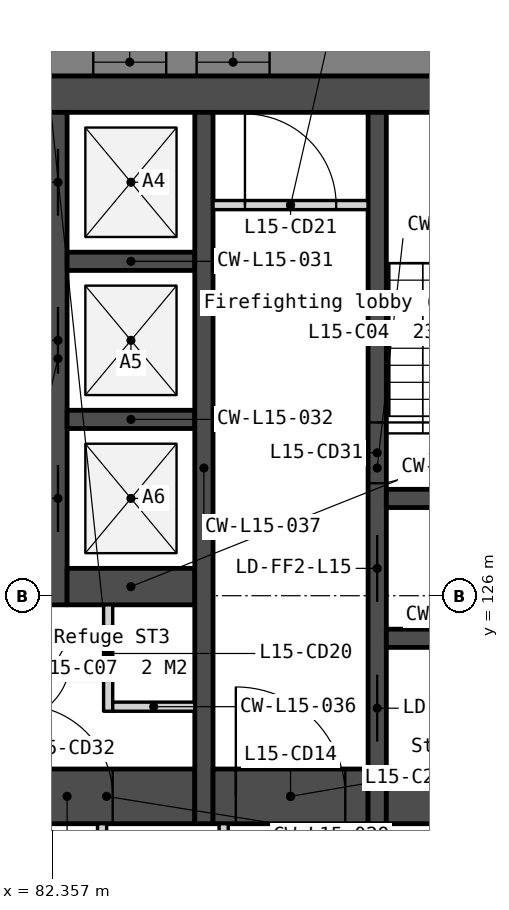
"""IFC4 building model, lengths in metres.
Left out: names, types, materials, properties, quantities, classifications, styles, units other than length and angle.
Written with IfcOpenShell. Run it as: python <this file> out.ifc"""

import sys

from ifc_helpers import new_model, si_unit, direction, frame, frame_2d, origin, place, context, subcontext, project, spatial, polyline, rectangle, outline, extrude, element, fill, save


model = new_model("IFC4")
c1 = context("Model", 3, precision=1e-05, world=origin(), true_north=direction((0.0, 1.0)))
c2 = subcontext(c1, "Body", "Model", "MODEL_VIEW")
j1 = project(units=[si_unit("LENGTHUNIT", "METRE"), si_unit("PLANEANGLEUNIT", "RADIAN")], contexts=[c1])
p1 = place(None, origin())
s1 = spatial("IfcSite", under=j1, at=p1, CompositionType="ELEMENT")
p2 = place(p1, origin())
s2 = spatial("IfcBuilding", under=s1, at=p2, CompositionType="ELEMENT")
p3 = place(p2, frame((0.0, 0.0, 66.5)))
s3 = spatial("IfcBuildingStorey", under=s2, at=p3, CompositionType="ELEMENT", Elevation=66.5)
p4 = place(p3, frame((66.0, 134.25, 0.0), z_axis=(0.0, 0.0, 1.0), x_axis=(1.0, 0.0, 0.0)))
e1 = element("IfcWall", 1, at=p4, inside=s3, PredefinedType="SOLIDWALL", context=c2, shape_type="SweptSolid", body=[
    extrude(rectangle(XDim=28.0, YDim=0.6, at=frame_2d((14.0, 0.0))), origin(), (0.0, 0.0, 1.0), 3.35),
])
p5 = place(p3, frame((81.8, 122.7, 0.0), z_axis=(0.0, 0.0, 1.0), x_axis=(1.0, 0.0, 0.0)))
e2 = element("IfcWall", 2, at=p5, inside=s3, PredefinedType="SOLIDWALL", context=c2, shape_type="SweptSolid", body=[
    extrude(rectangle(XDim=2.9, YDim=0.9, at=frame_2d((1.45, 0.0))), origin(), (0.0, 0.0, 1.0), 3.35),
])
p6 = place(p5, frame((0.05, 0.0, 0.0)))
e3 = element("IfcOpeningElement", 3, at=p6, cuts=e2, PredefinedType="OPENING", context=c2, shape_type="SweptSolid", body=[
    extrude(rectangle(XDim=1.5, YDim=2.1, at=frame_2d((0.75, 1.05))), frame((0.0, 0.46, 0.0), z_axis=(0.0, -1.0, 0.0), x_axis=(1.0, 0.0, 0.0)), (0.0, 0.0, 1.0), 0.92),
])
p7 = place(p3, frame((82.45, 133.95, 0.0), z_axis=(0.0, 0.0, 1.0), x_axis=(0.0, -1.0, 0.0)))
e4 = element("IfcWall", 4, at=p7, inside=s3, PredefinedType="SOLIDWALL", context=c2, shape_type="SweptSolid", body=[
    extrude(rectangle(XDim=8.1, YDim=0.3, at=frame_2d((4.05, 0.0))), origin(), (0.0, 0.0, 1.0), 3.35),
])
p8 = place(p7, frame((0.6, 0.0, 0.0)))
e5 = element("IfcOpeningElement", 5, at=p8, cuts=e4, PredefinedType="OPENING", context=c2, shape_type="SweptSolid", body=[
    extrude(rectangle(XDim=1.1, YDim=2.1, at=frame_2d((0.55, 1.05))), frame((0.0, 0.16, 0.0), z_axis=(0.0, -1.0, 0.0), x_axis=(1.0, 0.0, 0.0)), (0.0, 0.0, 1.0), 0.32),
])
p9 = place(p7, frame((3.2, 0.0, 0.0)))
e6 = element("IfcOpeningElement", 6, at=p9, cuts=e4, PredefinedType="OPENING", context=c2, shape_type="SweptSolid", body=[
    extrude(rectangle(XDim=1.1, YDim=2.1, at=frame_2d((0.55, 1.05))), frame((0.0, 0.16, 0.0), z_axis=(0.0, -1.0, 0.0), x_axis=(1.0, 0.0, 0.0)), (0.0, 0.0, 1.0), 0.32),
])
p10 = place(p7, frame((5.8, 0.0, 0.0)))
e7 = element("IfcOpeningElement", 7, at=p10, cuts=e4, PredefinedType="OPENING", context=c2, shape_type="SweptSolid", body=[
    extrude(rectangle(XDim=1.1, YDim=2.1, at=frame_2d((0.55, 1.05))), frame((0.0, 0.16, 0.0), z_axis=(0.0, -1.0, 0.0), x_axis=(1.0, 0.0, 0.0)), (0.0, 0.0, 1.0), 0.32),
])
for number, where, z_axis, x_axis in (
    (8, (82.6, 131.5, 0.0), (0.0, 0.0, 1.0), (1.0, 0.0, 0.0)),
    (9, (82.6, 128.9, 0.0), (0.0, 0.0, 1.0), (1.0, 0.0, 0.0)),
):
    element("IfcWall", number, at=place(p3, frame(where, z_axis=z_axis, x_axis=x_axis)), inside=s3, PredefinedType="SOLIDWALL", context=c2, shape_type="SweptSolid", body=[
        extrude(rectangle(XDim=2.1, YDim=0.3, at=frame_2d((1.05, 0.0))), origin(), (0.0, 0.0, 1.0), 3.35),
    ])
p11 = place(p3, frame((82.6, 126.15, 0.0), z_axis=(0.0, 0.0, 1.0), x_axis=(1.0, 0.0, 0.0)))
e10 = element("IfcWall", 10, at=p11, inside=s3, PredefinedType="SOLIDWALL", context=c2, shape_type="SweptSolid", body=[
    extrude(rectangle(XDim=2.1, YDim=0.6, at=frame_2d((1.05, 0.0))), origin(), (0.0, 0.0, 1.0), 3.35),
])
p12 = place(p3, frame((83.175, 122.25, 0.0), z_axis=(0.0, 0.0, 1.0), x_axis=(0.0, -1.0, 0.0)))
e11 = element("IfcWall", 11, at=p12, inside=s3, PredefinedType="PARTITIONING", context=c2, shape_type="SweptSolid", body=[
    extrude(rectangle(XDim=2.1, YDim=0.15, at=frame_2d((1.05, 0.0))), origin(), (0.0, 0.0, 1.0), 3.35),
])
p13 = place(p3, frame((83.275, 125.85, 0.0), z_axis=(0.0, 0.0, 1.0), x_axis=(0.0, -1.0, 0.0)))
e12 = element("IfcWall", 12, at=p13, inside=s3, PredefinedType="PARTITIONING", context=c2, shape_type="SweptSolid", body=[
    extrude(rectangle(XDim=1.75, YDim=0.15, at=frame_2d((0.875, 0.0))), origin(), (0.0, 0.0, 1.0), 3.35),
])
p14 = place(p13, frame((0.35, 0.0, 0.0)))
e13 = element("IfcOpeningElement", 13, at=p14, cuts=e12, PredefinedType="OPENING", context=c2, shape_type="SweptSolid", body=[
    extrude(rectangle(XDim=0.9, YDim=2.1, at=frame_2d((0.45, 1.05))), frame((0.0, 0.085, 0.0), z_axis=(0.0, -1.0, 0.0), x_axis=(1.0, 0.0, 0.0)), (0.0, 0.0, 1.0), 0.17),
])
p15 = place(p3, frame((83.35, 124.175, 0.0), z_axis=(0.0, 0.0, 1.0), x_axis=(1.0, 0.0, 0.0)))
e14 = element("IfcWall", 14, at=p15, inside=s3, PredefinedType="PARTITIONING", context=c2, shape_type="SweptSolid", body=[
    extrude(rectangle(XDim=1.35, YDim=0.15, at=frame_2d((0.675, 0.0))), origin(), (0.0, 0.0, 1.0), 3.35),
])
p16 = place(p3, frame((84.85, 133.95, 0.0), z_axis=(0.0, 0.0, 1.0), x_axis=(0.0, -1.0, 0.0)))
e15 = element("IfcWall", 15, at=p16, inside=s3, PredefinedType="SOLIDWALL", context=c2, shape_type="SweptSolid", body=[
    extrude(rectangle(XDim=11.7, YDim=0.3, at=frame_2d((5.85, 0.0))), origin(), (0.0, 0.0, 1.0), 3.35),
])
p17 = place(p3, frame((85.0, 132.425, 0.0), z_axis=(0.0, 0.0, 1.0), x_axis=(1.0, 0.0, 0.0)))
e16 = element("IfcWall", 16, at=p17, inside=s3, PredefinedType="PARTITIONING", context=c2, shape_type="SweptSolid", body=[
    extrude(rectangle(XDim=2.55, YDim=0.15, at=frame_2d((1.275, 0.0))), origin(), (0.0, 0.0, 1.0), 3.35),
])
p18 = place(p17, frame((0.525, 0.0, 0.0)))
e17 = element("IfcOpeningElement", 17, at=p18, cuts=e16, PredefinedType="OPENING", context=c2, shape_type="SweptSolid", body=[
    extrude(rectangle(XDim=1.5, YDim=2.1, at=frame_2d((0.75, 1.05))), frame((0.0, 0.085, 0.0), z_axis=(0.0, -1.0, 0.0), x_axis=(1.0, 0.0, 0.0)), (0.0, 0.0, 1.0), 0.17),
])
p19 = place(p3, frame((85.0, 122.7, 0.0), z_axis=(0.0, 0.0, 1.0), x_axis=(1.0, 0.0, 0.0)))
e18 = element("IfcWall", 18, at=p19, inside=s3, PredefinedType="SOLIDWALL", context=c2, shape_type="SweptSolid", body=[
    extrude(rectangle(XDim=2.55, YDim=0.9, at=frame_2d((1.275, 0.0))), origin(), (0.0, 0.0, 1.0), 3.35),
])
p20 = place(p19, frame((0.375, 0.0, 0.0)))
e19 = element("IfcOpeningElement", 19, at=p20, cuts=e18, PredefinedType="OPENING", context=c2, shape_type="SweptSolid", body=[
    extrude(rectangle(XDim=1.8, YDim=2.1, at=frame_2d((0.9, 1.05))), frame((0.0, 0.46, 0.0), z_axis=(0.0, -1.0, 0.0), x_axis=(1.0, 0.0, 0.0)), (0.0, 0.0, 1.0), 0.92),
])
p21 = place(p3, frame((85.175, 122.25, 0.0), z_axis=(0.0, 0.0, 1.0), x_axis=(0.0, -1.0, 0.0)))
e20 = element("IfcWall", 20, at=p21, inside=s3, PredefinedType="PARTITIONING", context=c2, shape_type="SweptSolid", body=[
    extrude(rectangle(XDim=2.1, YDim=0.15, at=frame_2d((1.05, 0.0))), origin(), (0.0, 0.0, 1.0), 3.35),
])
p22 = place(p21, frame((0.55, 0.0, 0.0)))
e21 = element("IfcOpeningElement", 21, at=p22, cuts=e20, PredefinedType="OPENING", context=c2, shape_type="SweptSolid", body=[
    extrude(rectangle(XDim=1.0, YDim=2.1, at=frame_2d((0.5, 1.05))), frame((0.0, 0.085, 0.0), z_axis=(0.0, -1.0, 0.0), x_axis=(1.0, 0.0, 0.0)), (0.0, 0.0, 1.0), 0.17),
])
p23 = place(p3, frame((87.375, 122.25, 0.0), z_axis=(0.0, 0.0, 1.0), x_axis=(0.0, -1.0, 0.0)))
e22 = element("IfcWall", 22, at=p23, inside=s3, PredefinedType="PARTITIONING", context=c2, shape_type="SweptSolid", body=[
    extrude(rectangle(XDim=2.1, YDim=0.15, at=frame_2d((1.05, 0.0))), origin(), (0.0, 0.0, 1.0), 3.35),
])
p24 = place(p3, frame((87.7, 133.95, 0.0), z_axis=(0.0, 0.0, 1.0), x_axis=(0.0, -1.0, 0.0)))
e23 = element("IfcWall", 23, at=p24, inside=s3, PredefinedType="SOLIDWALL", context=c2, shape_type="SweptSolid", body=[
    extrude(rectangle(XDim=11.7, YDim=0.3, at=frame_2d((5.85, 0.0))), origin(), (0.0, 0.0, 1.0), 3.35),
])
p25 = place(p24, frame((6.95, 0.0, 0.0)))
e24 = element("IfcOpeningElement", 24, at=p25, cuts=e23, PredefinedType="OPENING", context=c2, shape_type="SweptSolid", body=[
    extrude(rectangle(XDim=1.1, YDim=2.1, at=frame_2d((0.55, 1.05))), frame((0.0, 0.16, 0.0), z_axis=(0.0, -1.0, 0.0), x_axis=(1.0, 0.0, 0.0)), (0.0, 0.0, 1.0), 0.32),
])
p26 = place(p24, frame((5.1, 0.0, 0.0)))
e25 = element("IfcOpeningElement", 25, at=p26, cuts=e23, PredefinedType="OPENING", context=c2, shape_type="SweptSolid", body=[
    extrude(rectangle(XDim=1.0, YDim=2.1, at=frame_2d((0.5, 1.05))), frame((0.0, 0.16, 0.0), z_axis=(0.0, -1.0, 0.0), x_axis=(1.0, 0.0, 0.0)), (0.0, 0.0, 1.0), 0.32),
])
p27 = place(p24, frame((9.25, 0.0, 0.0)))
e26 = element("IfcOpeningElement", 26, at=p27, cuts=e23, PredefinedType="OPENING", context=c2, shape_type="SweptSolid", body=[
    extrude(rectangle(XDim=1.1, YDim=2.1, at=frame_2d((0.55, 1.05))), frame((0.0, 0.16, 0.0), z_axis=(0.0, -1.0, 0.0), x_axis=(1.0, 0.0, 0.0)), (0.0, 0.0, 1.0), 0.32),
])
for number, where, z_axis, x_axis in (
    (27, (87.85, 127.6, 0.0), (0.0, 0.0, 1.0), (1.0, 0.0, 0.0)),
    (28, (87.85, 125.3, 0.0), (0.0, 0.0, 1.0), (1.0, 0.0, 0.0)),
):
    element("IfcWall", number, at=place(p3, frame(where, z_axis=z_axis, x_axis=x_axis)), inside=s3, PredefinedType="SOLIDWALL", context=c2, shape_type="SweptSolid", body=[
        extrude(rectangle(XDim=2.55, YDim=0.3, at=frame_2d((1.275, 0.0))), origin(), (0.0, 0.0, 1.0), 3.35),
    ])
p28 = place(p3, frame((87.85, 122.7, 0.0), z_axis=(0.0, 0.0, 1.0), x_axis=(1.0, 0.0, 0.0)))
e29 = element("IfcWall", 29, at=p28, inside=s3, PredefinedType="SOLIDWALL", context=c2, shape_type="SweptSolid", body=[
    extrude(rectangle(XDim=2.55, YDim=0.9, at=frame_2d((1.275, 0.0))), origin(), (0.0, 0.0, 1.0), 3.35),
])
p29 = place(p3, frame((102.4, 134.775, -0.15), z_axis=(0.0, 0.0, 1.0), x_axis=(-1.0, 0.0, 0.0)))
e30 = element("IfcWall", 30, at=p29, inside=s3, PredefinedType="SOLIDWALL", context=c2, shape_type="SweptSolid", body=[
    extrude(outline(polyline([(44.8, 0.0), (44.8, 3.5), (0.0, 3.5), (0.0, 0.0), (44.8, 0.0)])), frame((0.0, 0.225, 0.0), z_axis=(0.0, -1.0, 0.0), x_axis=(1.0, 0.0, 0.0)), (0.0, 0.0, 1.0), 0.45),
])
p30 = place(p29, frame((0.722, 0.0, 1.05)))
e31 = element("IfcOpeningElement", 31, at=p30, cuts=e30, PredefinedType="OPENING", context=c2, shape_type="SweptSolid", body=[
    extrude(rectangle(XDim=1.2, YDim=1.5, at=frame_2d((0.6, 0.75))), frame((0.0, 0.235, 0.0), z_axis=(0.0, -1.0, 0.0), x_axis=(1.0, 0.0, 0.0)), (0.0, 0.0, 1.0), 0.47),
])
p31 = place(p29, frame((7.51, 0.0, 1.05)))
e32 = element("IfcOpeningElement", 32, at=p31, cuts=e30, PredefinedType="OPENING", context=c2, shape_type="SweptSolid", body=[
    extrude(rectangle(XDim=1.2, YDim=1.5, at=frame_2d((0.6, 0.75))), frame((0.0, 0.235, 0.0), z_axis=(0.0, -1.0, 0.0), x_axis=(1.0, 0.0, 0.0)), (0.0, 0.0, 1.0), 0.47),
])
p32 = place(p29, frame((9.21, 0.0, 1.05)))
e33 = element("IfcOpeningElement", 33, at=p32, cuts=e30, PredefinedType="OPENING", context=c2, shape_type="SweptSolid", body=[
    extrude(rectangle(XDim=1.2, YDim=1.5, at=frame_2d((0.6, 0.75))), frame((0.0, 0.235, 0.0), z_axis=(0.0, -1.0, 0.0), x_axis=(1.0, 0.0, 0.0)), (0.0, 0.0, 1.0), 0.47),
])
p33 = place(p29, frame((16.47, 0.0, 1.05)))
e34 = element("IfcOpeningElement", 34, at=p33, cuts=e30, PredefinedType="OPENING", context=c2, shape_type="SweptSolid", body=[
    extrude(rectangle(XDim=1.2, YDim=1.5, at=frame_2d((0.6, 0.75))), frame((0.0, 0.235, 0.0), z_axis=(0.0, -1.0, 0.0), x_axis=(1.0, 0.0, 0.0)), (0.0, 0.0, 1.0), 0.47),
])
p34 = place(p29, frame((18.17, 0.0, 1.05)))
e35 = element("IfcOpeningElement", 35, at=p34, cuts=e30, PredefinedType="OPENING", context=c2, shape_type="SweptSolid", body=[
    extrude(rectangle(XDim=1.2, YDim=1.5, at=frame_2d((0.6, 0.75))), frame((0.0, 0.235, 0.0), z_axis=(0.0, -1.0, 0.0), x_axis=(1.0, 0.0, 0.0)), (0.0, 0.0, 1.0), 0.47),
])
p35 = place(p29, frame((25.43, 0.0, 1.05)))
e36 = element("IfcOpeningElement", 36, at=p35, cuts=e30, PredefinedType="OPENING", context=c2, shape_type="SweptSolid", body=[
    extrude(rectangle(XDim=1.2, YDim=1.5, at=frame_2d((0.6, 0.75))), frame((0.0, 0.235, 0.0), z_axis=(0.0, -1.0, 0.0), x_axis=(1.0, 0.0, 0.0)), (0.0, 0.0, 1.0), 0.47),
])
p36 = place(p29, frame((27.13, 0.0, 1.05)))
e37 = element("IfcOpeningElement", 37, at=p36, cuts=e30, PredefinedType="OPENING", context=c2, shape_type="SweptSolid", body=[
    extrude(rectangle(XDim=1.2, YDim=1.5, at=frame_2d((0.6, 0.75))), frame((0.0, 0.235, 0.0), z_axis=(0.0, -1.0, 0.0), x_axis=(1.0, 0.0, 0.0)), (0.0, 0.0, 1.0), 0.47),
])
p37 = place(p29, frame((34.39, 0.0, 1.05)))
e38 = element("IfcOpeningElement", 38, at=p37, cuts=e30, PredefinedType="OPENING", context=c2, shape_type="SweptSolid", body=[
    extrude(rectangle(XDim=1.2, YDim=1.5, at=frame_2d((0.6, 0.75))), frame((0.0, 0.235, 0.0), z_axis=(0.0, -1.0, 0.0), x_axis=(1.0, 0.0, 0.0)), (0.0, 0.0, 1.0), 0.47),
])
p38 = place(p29, frame((36.09, 0.0, 1.05)))
e39 = element("IfcOpeningElement", 39, at=p38, cuts=e30, PredefinedType="OPENING", context=c2, shape_type="SweptSolid", body=[
    extrude(rectangle(XDim=1.2, YDim=1.5, at=frame_2d((0.6, 0.75))), frame((0.0, 0.235, 0.0), z_axis=(0.0, -1.0, 0.0), x_axis=(1.0, 0.0, 0.0)), (0.0, 0.0, 1.0), 0.47),
])
p39 = place(p29, frame((42.878, 0.0, 1.05)))
e40 = element("IfcOpeningElement", 40, at=p39, cuts=e30, PredefinedType="OPENING", context=c2, shape_type="SweptSolid", body=[
    extrude(rectangle(XDim=1.2, YDim=1.5, at=frame_2d((0.6, 0.75))), frame((0.0, 0.235, 0.0), z_axis=(0.0, -1.0, 0.0), x_axis=(1.0, 0.0, 0.0)), (0.0, 0.0, 1.0), 0.47),
])
p40 = place(p3, frame((88.435, 99.831, -0.15), z_axis=(0.0, 0.0, 1.0), x_axis=(0.500000806382, 0.866024938219, 0.0)))
e41 = element("IfcWall", 41, at=p40, inside=s3, PredefinedType="SOLIDWALL", context=c2, shape_type="SweptSolid", body=[
    extrude(outline(polyline([(34.14, 3.5), (34.14, 0.0), (0.0, 0.0), (0.0, 3.5), (34.14, 3.5)])), frame((0.0, 0.225, 0.0), z_axis=(0.0, -1.0, 0.0), x_axis=(1.0, 0.0, 0.0)), (0.0, 0.0, 1.0), 0.45),
])
p41 = place(p40, frame((5.81, 0.0, 1.05)))
e42 = element("IfcOpeningElement", 42, at=p41, cuts=e41, PredefinedType="OPENING", context=c2, shape_type="SweptSolid", body=[
    extrude(rectangle(XDim=1.2, YDim=1.5, at=frame_2d((0.6, 0.75))), frame((0.0, 0.235, 0.0), z_axis=(0.0, -1.0, 0.0), x_axis=(1.0, 0.0, 0.0)), (0.0, 0.0, 1.0), 0.47),
])
p42 = place(p40, frame((7.51, 0.0, 1.05)))
e43 = element("IfcOpeningElement", 43, at=p42, cuts=e41, PredefinedType="OPENING", context=c2, shape_type="SweptSolid", body=[
    extrude(rectangle(XDim=1.2, YDim=1.5, at=frame_2d((0.6, 0.75))), frame((0.0, 0.235, 0.0), z_axis=(0.0, -1.0, 0.0), x_axis=(1.0, 0.0, 0.0)), (0.0, 0.0, 1.0), 0.47),
])
p43 = place(p40, frame((14.77, 0.0, 1.05)))
e44 = element("IfcOpeningElement", 44, at=p43, cuts=e41, PredefinedType="OPENING", context=c2, shape_type="SweptSolid", body=[
    extrude(rectangle(XDim=1.2, YDim=1.5, at=frame_2d((0.6, 0.75))), frame((0.0, 0.235, 0.0), z_axis=(0.0, -1.0, 0.0), x_axis=(1.0, 0.0, 0.0)), (0.0, 0.0, 1.0), 0.47),
])
p44 = place(p40, frame((16.47, 0.0, 1.05)))
e45 = element("IfcOpeningElement", 45, at=p44, cuts=e41, PredefinedType="OPENING", context=c2, shape_type="SweptSolid", body=[
    extrude(rectangle(XDim=1.2, YDim=1.5, at=frame_2d((0.6, 0.75))), frame((0.0, 0.235, 0.0), z_axis=(0.0, -1.0, 0.0), x_axis=(1.0, 0.0, 0.0)), (0.0, 0.0, 1.0), 0.47),
])
p45 = place(p40, frame((23.73, 0.0, 1.05)))
e46 = element("IfcOpeningElement", 46, at=p45, cuts=e41, PredefinedType="OPENING", context=c2, shape_type="SweptSolid", body=[
    extrude(rectangle(XDim=1.2, YDim=1.5, at=frame_2d((0.6, 0.75))), frame((0.0, 0.235, 0.0), z_axis=(0.0, -1.0, 0.0), x_axis=(1.0, 0.0, 0.0)), (0.0, 0.0, 1.0), 0.47),
])
p46 = place(p40, frame((25.43, 0.0, 1.05)))
e47 = element("IfcOpeningElement", 47, at=p46, cuts=e41, PredefinedType="OPENING", context=c2, shape_type="SweptSolid", body=[
    extrude(rectangle(XDim=1.2, YDim=1.5, at=frame_2d((0.6, 0.75))), frame((0.0, 0.235, 0.0), z_axis=(0.0, -1.0, 0.0), x_axis=(1.0, 0.0, 0.0)), (0.0, 0.0, 1.0), 0.47),
])
p47 = place(p40, frame((32.218, 0.0, 1.05)))
e48 = element("IfcOpeningElement", 48, at=p47, cuts=e41, PredefinedType="OPENING", context=c2, shape_type="SweptSolid", body=[
    extrude(rectangle(XDim=1.2, YDim=1.5, at=frame_2d((0.6, 0.75))), frame((0.0, 0.235, 0.0), z_axis=(0.0, -1.0, 0.0), x_axis=(1.0, 0.0, 0.0)), (0.0, 0.0, 1.0), 0.47),
])
p48 = place(p8, origin())
e49 = element("IfcDoor", 49, at=p48, inside=s3, OperationType="SLIDING_TO_LEFT", PredefinedType="DOOR", context=c2, shape_type="SweptSolid", body=[
    extrude(rectangle(XDim=1.1, YDim=2.1, at=frame_2d((0.55, 1.05))), frame((0.0, 0.025, 0.0), z_axis=(0.0, -1.0, 0.0), x_axis=(1.0, 0.0, 0.0)), (0.0, 0.0, 1.0), 0.05),
])
fill(e5, e49)
p49 = place(p9, origin())
e50 = element("IfcDoor", 50, at=p49, inside=s3, OperationType="SLIDING_TO_LEFT", PredefinedType="DOOR", context=c2, shape_type="SweptSolid", body=[
    extrude(rectangle(XDim=1.1, YDim=2.1, at=frame_2d((0.55, 1.05))), frame((0.0, 0.025, 0.0), z_axis=(0.0, -1.0, 0.0), x_axis=(1.0, 0.0, 0.0)), (0.0, 0.0, 1.0), 0.05),
])
fill(e6, e50)
p50 = place(p10, origin())
e51 = element("IfcDoor", 51, at=p50, inside=s3, OperationType="SLIDING_TO_LEFT", PredefinedType="DOOR", context=c2, shape_type="SweptSolid", body=[
    extrude(rectangle(XDim=1.1, YDim=2.1, at=frame_2d((0.55, 1.05))), frame((0.0, 0.025, 0.0), z_axis=(0.0, -1.0, 0.0), x_axis=(1.0, 0.0, 0.0)), (0.0, 0.0, 1.0), 0.05),
])
fill(e7, e51)
p51 = place(p25, origin())
e52 = element("IfcDoor", 52, at=p51, inside=s3, OperationType="SLIDING_TO_LEFT", PredefinedType="DOOR", context=c2, shape_type="SweptSolid", body=[
    extrude(rectangle(XDim=1.1, YDim=2.1, at=frame_2d((0.55, 1.05))), frame((0.0, 0.025, 0.0), z_axis=(0.0, -1.0, 0.0), x_axis=(1.0, 0.0, 0.0)), (0.0, 0.0, 1.0), 0.05),
])
fill(e24, e52)
p52 = place(p20, origin())
e53 = element("IfcDoor", 53, at=p52, inside=s3, OperationType="DOUBLE_DOOR_DOUBLE_SWING", PredefinedType="DOOR", context=c2, shape_type="SweptSolid", body=[
    extrude(rectangle(XDim=1.8, YDim=2.1, at=frame_2d((0.9, 1.05))), frame((0.0, 0.025, 0.0), z_axis=(0.0, -1.0, 0.0), x_axis=(1.0, 0.0, 0.0)), (0.0, 0.0, 1.0), 0.05),
])
fill(e19, e53)
p53 = place(p6, origin())
e54 = element("IfcDoor", 54, at=p53, inside=s3, OperationType="DOUBLE_DOOR_DOUBLE_SWING", PredefinedType="DOOR", context=c2, shape_type="SweptSolid", body=[
    extrude(rectangle(XDim=1.5, YDim=2.1, at=frame_2d((0.75, 1.05))), frame((0.0, 0.025, 0.0), z_axis=(0.0, -1.0, 0.0), x_axis=(1.0, 0.0, 0.0)), (0.0, 0.0, 1.0), 0.05),
])
fill(e3, e54)
p54 = place(p14, origin())
e55 = element("IfcDoor", 55, at=p54, inside=s3, OperationType="SINGLE_SWING_RIGHT", PredefinedType="DOOR", context=c2, shape_type="SweptSolid", body=[
    extrude(rectangle(XDim=0.9, YDim=2.1, at=frame_2d((0.45, 1.05))), frame((0.0, 0.025, 0.0), z_axis=(0.0, -1.0, 0.0), x_axis=(1.0, 0.0, 0.0)), (0.0, 0.0, 1.0), 0.05),
])
fill(e13, e55)
p55 = place(p18, origin())
e56 = element("IfcDoor", 56, at=p55, inside=s3, OperationType="DOUBLE_DOOR_DOUBLE_SWING", PredefinedType="DOOR", context=c2, shape_type="SweptSolid", body=[
    extrude(rectangle(XDim=1.5, YDim=2.1, at=frame_2d((0.75, 1.05))), frame((0.0, 0.025, 0.0), z_axis=(0.0, -1.0, 0.0), x_axis=(1.0, 0.0, 0.0)), (0.0, 0.0, 1.0), 0.05),
])
fill(e17, e56)
p56 = place(p26, origin())
e57 = element("IfcDoor", 57, at=p56, inside=s3, OperationType="SINGLE_SWING_LEFT", PredefinedType="DOOR", context=c2, shape_type="SweptSolid", body=[
    extrude(rectangle(XDim=1.0, YDim=2.1, at=frame_2d((0.5, 1.05))), frame((0.0, 0.025, 0.0), z_axis=(0.0, -1.0, 0.0), x_axis=(1.0, 0.0, 0.0)), (0.0, 0.0, 1.0), 0.05),
])
fill(e25, e57)
p57 = place(p27, origin())
e58 = element("IfcDoor", 58, at=p57, inside=s3, OperationType="SLIDING_TO_LEFT", PredefinedType="DOOR", context=c2, shape_type="SweptSolid", body=[
    extrude(rectangle(XDim=1.1, YDim=2.1, at=frame_2d((0.55, 1.05))), frame((0.0, 0.025, 0.0), z_axis=(0.0, -1.0, 0.0), x_axis=(1.0, 0.0, 0.0)), (0.0, 0.0, 1.0), 0.05),
])
fill(e26, e58)
p58 = place(p33, origin())
e59 = element("IfcWindow", 59, at=p58, inside=s3, PartitioningType="SINGLE_PANEL", PredefinedType="WINDOW", context=c2, shape_type="SweptSolid", body=[
    extrude(rectangle(XDim=1.2, YDim=1.5, at=frame_2d((0.6, 0.75))), frame((0.0, 0.03, 0.0), z_axis=(0.0, -1.0, 0.0), x_axis=(1.0, 0.0, 0.0)), (0.0, 0.0, 1.0), 0.06),
])
fill(e34, e59)
p59 = place(p34, origin())
e60 = element("IfcWindow", 60, at=p59, inside=s3, PartitioningType="SINGLE_PANEL", PredefinedType="WINDOW", context=c2, shape_type="SweptSolid", body=[
    extrude(rectangle(XDim=1.2, YDim=1.5, at=frame_2d((0.6, 0.75))), frame((0.0, 0.03, 0.0), z_axis=(0.0, -1.0, 0.0), x_axis=(1.0, 0.0, 0.0)), (0.0, 0.0, 1.0), 0.06),
])
fill(e35, e60)
save(model, sys.argv[1])
